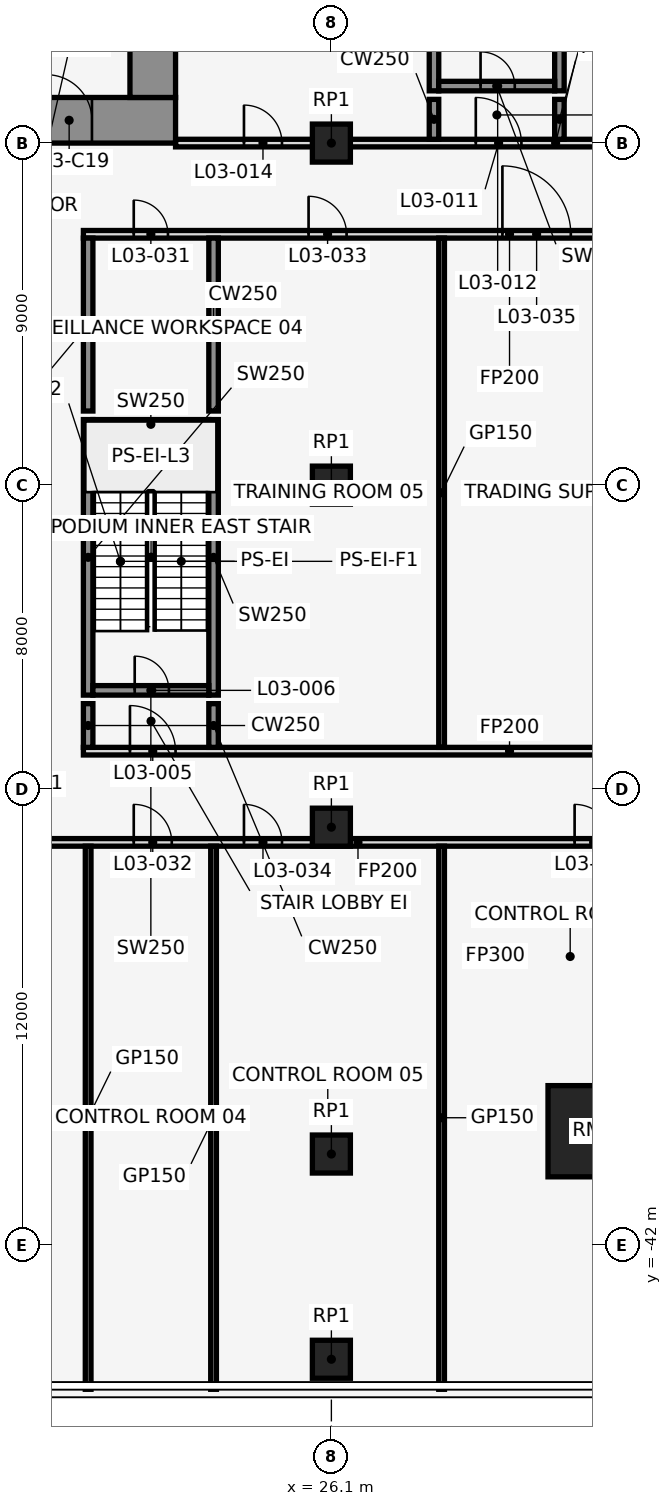
"""IFC4 building model, lengths in metres.
Left out: names, types, materials, properties, quantities, classifications, styles, units other than length and angle.
Written with IfcOpenShell. Run it as: python <this file> out.ifc"""

import sys

from ifc_helpers import new_model, si_unit, direction, frame, frame_2d, origin, origin_2d, place, context, subcontext, project, spatial, rectangle, extrude, element, fill, save


model = new_model("IFC4")
c1 = context("Model", 3, precision=1e-05, world=origin(), true_north=direction((0.0, 1.0)))
c2 = subcontext(c1, "Body", "Model", "MODEL_VIEW")
j1 = project(units=[si_unit("LENGTHUNIT", "METRE"), si_unit("PLANEANGLEUNIT", "RADIAN")], contexts=[c1])
p1 = place(None, origin())
s1 = spatial("IfcSite", under=j1, at=p1, CompositionType="ELEMENT")
p2 = place(p1, origin())
s2 = spatial("IfcBuilding", under=s1, at=p2, CompositionType="ELEMENT")
p3 = place(p2, frame((0.0, 0.0, 20.0)))
s3 = spatial("IfcBuildingStorey", under=s2, at=p3, CompositionType="ELEMENT", Elevation=20.0)
p4 = place(p3, frame((26.1, -39.6, 0.0), z_axis=(0.0, 0.0, 1.0), x_axis=(1.0, 0.0, 0.0)))
e1 = element("IfcColumn", 1, at=p4, inside=s3, PredefinedType="COLUMN", context=c2, shape_type="SweptSolid", body=[
    extrude(rectangle(XDim=1.0, YDim=1.0, at=origin_2d()), origin(), (0.0, 0.0, 1.0), 5.0),
])
p5 = place(p3, frame((33.0, -39.0, 0.0), z_axis=(0.0, 0.0, 1.0), x_axis=(1.0, 0.0, 0.0)))
e2 = element("IfcColumn", 2, at=p5, inside=s3, PredefinedType="COLUMN", context=c2, shape_type="SweptSolid", body=[
    extrude(rectangle(XDim=2.4, YDim=2.4, at=origin_2d()), origin(), (0.0, 0.0, 1.0), 5.0),
])
for number, where, z_axis, x_axis in (
    (3, (26.1, -22.0, 0.0), (0.0, 0.0, 1.0), (1.0, 0.0, 0.0)),
    (4, (26.1, -13.0, 0.0), (0.0, 0.0, 1.0), (1.0, 0.0, 0.0)),
    (5, (26.1, -31.0, 0.0), (0.0, 0.0, 1.0), (1.0, 0.0, 0.0)),
    (6, (26.1, -45.0, 0.0), (0.0, 0.0, 1.0), (1.0, 0.0, 0.0)),
):
    element("IfcColumn", number, at=place(p3, frame(where, z_axis=z_axis, x_axis=x_axis)), inside=s3, PredefinedType="COLUMN", context=c2, shape_type="SweptSolid", body=[
        extrude(rectangle(XDim=1.0, YDim=1.0, at=origin_2d()), origin(), (0.0, 0.0, 1.0), 5.0),
    ])
for number, where, z_axis, x_axis in (
    (7, (28.8, -11.625, 0.0), (0.0, 0.0, 1.0), (0.0, 1.0, 0.0)),
    (8, (32.1, -11.625, 0.0), (0.0, 0.0, 1.0), (0.0, 1.0, 0.0)),
):
    element("IfcWall", number, at=place(p3, frame(where, z_axis=z_axis, x_axis=x_axis)), inside=s3, PredefinedType="SHEAR", context=c2, shape_type="SweptSolid", body=[
        extrude(rectangle(XDim=7.25, YDim=0.25, at=frame_2d((3.625, 0.0))), origin(), (0.0, 0.0, 1.0), 5.0),
    ])
p6 = place(p3, frame((28.925, -11.5, 0.0), z_axis=(0.0, 0.0, 1.0), x_axis=(1.0, 0.0, 0.0)))
e9 = element("IfcWall", 9, at=p6, inside=s3, PredefinedType="SHEAR", context=c2, shape_type="SweptSolid", body=[
    extrude(rectangle(XDim=3.05, YDim=0.25, at=frame_2d((1.525, 0.0))), origin(), (0.0, 0.0, 1.0), 5.0),
])
p7 = place(p6, frame((1.1, 0.0, 0.0)))
e10 = element("IfcOpeningElement", 10, at=p7, cuts=e9, PredefinedType="OPENING", context=c2, shape_type="SweptSolid", body=[
    extrude(rectangle(XDim=0.9, YDim=2.1, at=frame_2d((0.45, 1.05))), frame((0.0, 0.137, 0.0), z_axis=(0.0, -1.0, 0.0), x_axis=(1.0, 0.0, 0.0)), (0.0, 0.0, 1.0), 0.274),
])
for number, where, z_axis, x_axis in (
    (11, (19.7, -27.525, 0.0), (0.0, 0.0, 1.0), (0.0, 1.0, 0.0)),
    (12, (23.0, -27.525, 0.0), (0.0, 0.0, 1.0), (0.0, 1.0, 0.0)),
):
    element("IfcWall", number, at=place(p3, frame(where, z_axis=z_axis, x_axis=x_axis)), inside=s3, PredefinedType="SHEAR", context=c2, shape_type="SweptSolid", body=[
        extrude(rectangle(XDim=7.25, YDim=0.25, at=frame_2d((3.625, 0.0))), origin(), (0.0, 0.0, 1.0), 5.0),
    ])
p8 = place(p3, frame((19.825, -27.4, 0.0), z_axis=(0.0, 0.0, 1.0), x_axis=(1.0, 0.0, 0.0)))
e13 = element("IfcWall", 13, at=p8, inside=s3, PredefinedType="SHEAR", context=c2, shape_type="SweptSolid", body=[
    extrude(rectangle(XDim=3.05, YDim=0.25, at=frame_2d((1.525, 0.0))), origin(), (0.0, 0.0, 1.0), 5.0),
])
p9 = place(p8, frame((1.1, 0.0, 0.0)))
e14 = element("IfcOpeningElement", 14, at=p9, cuts=e13, PredefinedType="OPENING", context=c2, shape_type="SweptSolid", body=[
    extrude(rectangle(XDim=0.9, YDim=2.1, at=frame_2d((0.45, 1.05))), frame((0.0, 0.137, 0.0), z_axis=(0.0, -1.0, 0.0), x_axis=(1.0, 0.0, 0.0)), (0.0, 0.0, 1.0), 0.274),
])
p10 = place(p3, frame((19.825, -20.4, 0.0), z_axis=(0.0, 0.0, 1.0), x_axis=(1.0, 0.0, 0.0)))
e15 = element("IfcWall", 15, at=p10, inside=s3, PredefinedType="SHEAR", context=c2, shape_type="SweptSolid", body=[
    extrude(rectangle(XDim=3.05, YDim=0.25, at=frame_2d((1.525, 0.0))), origin(), (0.0, 0.0, 1.0), 5.0),
])
p11 = place(p3, frame((11.6, -31.4, 0.0), z_axis=(0.0, 0.0, 1.0), x_axis=(1.0, 0.0, 0.0)))
e16 = element("IfcWall", 16, at=p11, inside=s3, PredefinedType="PARTITIONING", context=c2, shape_type="SweptSolid", body=[
    extrude(rectangle(XDim=30.4, YDim=0.2, at=frame_2d((15.2, 0.0))), origin(), (0.0, 0.0, 1.0), 4.7),
])
p12 = place(p11, frame((2.0, 0.0, 0.0)))
e17 = element("IfcOpeningElement", 17, at=p12, cuts=e16, PredefinedType="OPENING", context=c2, shape_type="SweptSolid", body=[
    extrude(rectangle(XDim=1.0, YDim=2.1, at=frame_2d((0.5, 1.05))), frame((0.0, 0.112, 0.0), z_axis=(0.0, -1.0, 0.0), x_axis=(1.0, 0.0, 0.0)), (0.0, 0.0, 1.0), 0.224),
])
p13 = place(p11, frame((9.3, 0.0, 0.0)))
e18 = element("IfcOpeningElement", 18, at=p13, cuts=e16, PredefinedType="OPENING", context=c2, shape_type="SweptSolid", body=[
    extrude(rectangle(XDim=1.0, YDim=2.1, at=frame_2d((0.5, 1.05))), frame((0.0, 0.112, 0.0), z_axis=(0.0, -1.0, 0.0), x_axis=(1.0, 0.0, 0.0)), (0.0, 0.0, 1.0), 0.224),
])
p14 = place(p11, frame((12.2, 0.0, 0.0)))
e19 = element("IfcOpeningElement", 19, at=p14, cuts=e16, PredefinedType="OPENING", context=c2, shape_type="SweptSolid", body=[
    extrude(rectangle(XDim=1.0, YDim=2.1, at=frame_2d((0.5, 1.05))), frame((0.0, 0.112, 0.0), z_axis=(0.0, -1.0, 0.0), x_axis=(1.0, 0.0, 0.0)), (0.0, 0.0, 1.0), 0.224),
])
p15 = place(p11, frame((20.9, 0.0, 0.0)))
e20 = element("IfcOpeningElement", 20, at=p15, cuts=e16, PredefinedType="OPENING", context=c2, shape_type="SweptSolid", body=[
    extrude(rectangle(XDim=1.0, YDim=2.1, at=frame_2d((0.5, 1.05))), frame((0.0, 0.112, 0.0), z_axis=(0.0, -1.0, 0.0), x_axis=(1.0, 0.0, 0.0)), (0.0, 0.0, 1.0), 0.224),
])
p16 = place(p11, frame((27.9, 0.0, 0.0)))
e21 = element("IfcOpeningElement", 21, at=p16, cuts=e16, PredefinedType="OPENING", context=c2, shape_type="SweptSolid", body=[
    extrude(rectangle(XDim=1.0, YDim=2.1, at=frame_2d((0.5, 1.05))), frame((0.0, 0.112, 0.0), z_axis=(0.0, -1.0, 0.0), x_axis=(1.0, 0.0, 0.0)), (0.0, 0.0, 1.0), 0.224),
])
p17 = place(p3, frame((19.575, -29.0, 0.0), z_axis=(0.0, 0.0, 1.0), x_axis=(1.0, 0.0, 0.0)))
e22 = element("IfcWall", 22, at=p17, inside=s3, PredefinedType="PARTITIONING", context=c2, shape_type="SweptSolid", body=[
    extrude(rectangle(XDim=22.425, YDim=0.2, at=frame_2d((11.212, 0.0))), origin(), (0.0, 0.0, 1.0), 4.7),
])
p18 = place(p17, frame((1.225, 0.0, 0.0)))
e23 = element("IfcOpeningElement", 23, at=p18, cuts=e22, PredefinedType="OPENING", context=c2, shape_type="SweptSolid", body=[
    extrude(rectangle(XDim=1.2, YDim=2.1, at=frame_2d((0.6, 1.05))), frame((0.0, 0.112, 0.0), z_axis=(0.0, -1.0, 0.0), x_axis=(1.0, 0.0, 0.0)), (0.0, 0.0, 1.0), 0.224),
])
p19 = place(p17, frame((19.425, 0.0, 0.0)))
e24 = element("IfcOpeningElement", 24, at=p19, cuts=e22, PredefinedType="OPENING", context=c2, shape_type="SweptSolid", body=[
    extrude(rectangle(XDim=1.2, YDim=2.1, at=frame_2d((0.6, 1.05))), frame((0.0, 0.112, 0.0), z_axis=(0.0, -1.0, 0.0), x_axis=(1.0, 0.0, 0.0)), (0.0, 0.0, 1.0), 0.224),
])
p20 = place(p3, frame((19.575, -15.4, 0.0), z_axis=(0.0, 0.0, 1.0), x_axis=(1.0, 0.0, 0.0)))
e25 = element("IfcWall", 25, at=p20, inside=s3, PredefinedType="PARTITIONING", context=c2, shape_type="SweptSolid", body=[
    extrude(rectangle(XDim=22.425, YDim=0.2, at=frame_2d((11.212, 0.0))), origin(), (0.0, 0.0, 1.0), 4.7),
])
p21 = place(p20, frame((1.325, 0.0, 0.0)))
e26 = element("IfcOpeningElement", 26, at=p21, cuts=e25, PredefinedType="OPENING", context=c2, shape_type="SweptSolid", body=[
    extrude(rectangle(XDim=0.9, YDim=2.1, at=frame_2d((0.45, 1.05))), frame((0.0, 0.112, 0.0), z_axis=(0.0, -1.0, 0.0), x_axis=(1.0, 0.0, 0.0)), (0.0, 0.0, 1.0), 0.224),
])
p22 = place(p20, frame((5.925, 0.0, 0.0)))
e27 = element("IfcOpeningElement", 27, at=p22, cuts=e25, PredefinedType="OPENING", context=c2, shape_type="SweptSolid", body=[
    extrude(rectangle(XDim=1.0, YDim=2.1, at=frame_2d((0.5, 1.05))), frame((0.0, 0.112, 0.0), z_axis=(0.0, -1.0, 0.0), x_axis=(1.0, 0.0, 0.0)), (0.0, 0.0, 1.0), 0.224),
])
p23 = place(p20, frame((11.025, 0.0, 0.0)))
e28 = element("IfcOpeningElement", 28, at=p23, cuts=e25, PredefinedType="OPENING", context=c2, shape_type="SweptSolid", body=[
    extrude(rectangle(XDim=1.8, YDim=2.1, at=frame_2d((0.9, 1.05))), frame((0.0, 0.112, 0.0), z_axis=(0.0, -1.0, 0.0), x_axis=(1.0, 0.0, 0.0)), (0.0, 0.0, 1.0), 0.224),
])
p24 = place(p20, frame((19.925, 0.0, 0.0)))
e29 = element("IfcOpeningElement", 29, at=p24, cuts=e25, PredefinedType="OPENING", context=c2, shape_type="SweptSolid", body=[
    extrude(rectangle(XDim=0.9, YDim=2.1, at=frame_2d((0.45, 1.05))), frame((0.0, 0.112, 0.0), z_axis=(0.0, -1.0, 0.0), x_axis=(1.0, 0.0, 0.0)), (0.0, 0.0, 1.0), 0.224),
])
p25 = place(p3, frame((22.0, -13.0, 0.0), z_axis=(0.0, 0.0, 1.0), x_axis=(1.0, 0.0, 0.0)))
e30 = element("IfcWall", 30, at=p25, inside=s3, PredefinedType="PARTITIONING", context=c2, shape_type="SweptSolid", body=[
    extrude(rectangle(XDim=20.0, YDim=0.2, at=frame_2d((10.0, 0.0))), origin(), (0.0, 0.0, 1.0), 4.7),
])
p26 = place(p25, frame((7.9, 0.0, 0.0)))
e31 = element("IfcOpeningElement", 31, at=p26, cuts=e30, PredefinedType="OPENING", context=c2, shape_type="SweptSolid", body=[
    extrude(rectangle(XDim=1.2, YDim=2.1, at=frame_2d((0.6, 1.05))), frame((0.0, 0.112, 0.0), z_axis=(0.0, -1.0, 0.0), x_axis=(1.0, 0.0, 0.0)), (0.0, 0.0, 1.0), 0.224),
])
p27 = place(p25, frame((1.8, 0.0, 0.0)))
e32 = element("IfcOpeningElement", 32, at=p27, cuts=e30, PredefinedType="OPENING", context=c2, shape_type="SweptSolid", body=[
    extrude(rectangle(XDim=1.0, YDim=2.1, at=frame_2d((0.5, 1.05))), frame((0.0, 0.112, 0.0), z_axis=(0.0, -1.0, 0.0), x_axis=(1.0, 0.0, 0.0)), (0.0, 0.0, 1.0), 0.224),
])
p28 = place(p3, frame((19.7, -45.79, 0.0), z_axis=(0.0, 0.0, 1.0), x_axis=(0.0, 1.0, 0.0)))
e33 = element("IfcWall", 33, at=p28, inside=s3, PredefinedType="PARTITIONING", context=c2, shape_type="SweptSolid", body=[
    extrude(rectangle(XDim=14.29, YDim=0.15, at=frame_2d((7.145, 0.0))), origin(), (0.0, 0.0, 1.0), 4.7),
])
p29 = place(p3, frame((19.7, -28.9, 0.0), z_axis=(0.0, 0.0, 1.0), x_axis=(0.0, 1.0, 0.0)))
e34 = element("IfcWall", 34, at=p29, inside=s3, PredefinedType="SHEAR", context=c2, shape_type="SweptSolid", body=[
    extrude(rectangle(XDim=1.15, YDim=0.25, at=frame_2d((0.575, 0.0))), origin(), (0.0, 0.0, 1.0), 5.0),
])
p30 = place(p3, frame((19.7, -20.05, 0.0), z_axis=(0.0, 0.0, 1.0), x_axis=(0.0, 1.0, 0.0)))
e35 = element("IfcWall", 35, at=p30, inside=s3, PredefinedType="SHEAR", context=c2, shape_type="SweptSolid", body=[
    extrude(rectangle(XDim=4.55, YDim=0.25, at=frame_2d((2.275, 0.0))), origin(), (0.0, 0.0, 1.0), 5.0),
])
p31 = place(p3, frame((23.0, -45.79, 0.0), z_axis=(0.0, 0.0, 1.0), x_axis=(0.0, 1.0, 0.0)))
e36 = element("IfcWall", 36, at=p31, inside=s3, PredefinedType="PARTITIONING", context=c2, shape_type="SweptSolid", body=[
    extrude(rectangle(XDim=14.29, YDim=0.15, at=frame_2d((7.145, 0.0))), origin(), (0.0, 0.0, 1.0), 4.7),
])
p32 = place(p3, frame((23.0, -28.9, 0.0), z_axis=(0.0, 0.0, 1.0), x_axis=(0.0, 1.0, 0.0)))
e37 = element("IfcWall", 37, at=p32, inside=s3, PredefinedType="SHEAR", context=c2, shape_type="SweptSolid", body=[
    extrude(rectangle(XDim=1.15, YDim=0.25, at=frame_2d((0.575, 0.0))), origin(), (0.0, 0.0, 1.0), 5.0),
])
p33 = place(p3, frame((23.0, -20.05, 0.0), z_axis=(0.0, 0.0, 1.0), x_axis=(0.0, 1.0, 0.0)))
e38 = element("IfcWall", 38, at=p33, inside=s3, PredefinedType="SHEAR", context=c2, shape_type="SweptSolid", body=[
    extrude(rectangle(XDim=4.55, YDim=0.25, at=frame_2d((2.275, 0.0))), origin(), (0.0, 0.0, 1.0), 5.0),
])
p34 = place(p3, frame((28.8, -12.9, 0.0), z_axis=(0.0, 0.0, 1.0), x_axis=(0.0, 1.0, 0.0)))
e39 = element("IfcWall", 39, at=p34, inside=s3, PredefinedType="SHEAR", context=c2, shape_type="SweptSolid", body=[
    extrude(rectangle(XDim=1.05, YDim=0.25, at=frame_2d((0.525, 0.0))), origin(), (0.0, 0.0, 1.0), 5.0),
])
p35 = place(p3, frame((29.0, -45.79, 0.0), z_axis=(0.0, 0.0, 1.0), x_axis=(0.0, 1.0, 0.0)))
e40 = element("IfcWall", 40, at=p35, inside=s3, PredefinedType="PARTITIONING", context=c2, shape_type="SweptSolid", body=[
    extrude(rectangle(XDim=14.29, YDim=0.15, at=frame_2d((7.145, 0.0))), origin(), (0.0, 0.0, 1.0), 4.7),
])
p36 = place(p3, frame((29.0, -28.9, 0.0), z_axis=(0.0, 0.0, 1.0), x_axis=(0.0, 1.0, 0.0)))
e41 = element("IfcWall", 41, at=p36, inside=s3, PredefinedType="PARTITIONING", context=c2, shape_type="SweptSolid", body=[
    extrude(rectangle(XDim=13.4, YDim=0.15, at=frame_2d((6.7, 0.0))), origin(), (0.0, 0.0, 1.0), 4.7),
])
p37 = place(p3, frame((32.1, -12.9, 0.0), z_axis=(0.0, 0.0, 1.0), x_axis=(0.0, 1.0, 0.0)))
e42 = element("IfcWall", 42, at=p37, inside=s3, PredefinedType="SHEAR", context=c2, shape_type="SweptSolid", body=[
    extrude(rectangle(XDim=1.05, YDim=0.25, at=frame_2d((0.525, 0.0))), origin(), (0.0, 0.0, 1.0), 5.0),
])
p38 = place(p3, frame((-22.0, -12.4, 0.0), z_axis=(0.0, 0.0, 1.0), x_axis=(1.0, 0.0, 0.0)))
e43 = element("IfcWall", 43, at=p38, inside=s3, PredefinedType="SHEAR", context=c2, shape_type="SweptSolid", body=[
    extrude(rectangle(XDim=44.0, YDim=1.2, at=frame_2d((22.0, 0.0))), origin(), (0.0, 0.0, 1.0), 5.0),
])
p39 = place(p38, frame((2.2, 0.0, 0.0)))
e44 = element("IfcOpeningElement", 44, at=p39, cuts=e43, PredefinedType="OPENING", context=c2, shape_type="SweptSolid", body=[
    extrude(rectangle(XDim=1.2, YDim=2.1, at=frame_2d((0.6, 1.05))), frame((0.0, 0.612, 0.0), z_axis=(0.0, -1.0, 0.0), x_axis=(1.0, 0.0, 0.0)), (0.0, 0.0, 1.0), 1.224),
])
p40 = place(p38, frame((21.4, 0.0, 0.0)))
e45 = element("IfcOpeningElement", 45, at=p40, cuts=e43, PredefinedType="OPENING", context=c2, shape_type="SweptSolid", body=[
    extrude(rectangle(XDim=1.2, YDim=2.1, at=frame_2d((0.6, 1.05))), frame((0.0, 0.612, 0.0), z_axis=(0.0, -1.0, 0.0), x_axis=(1.0, 0.0, 0.0)), (0.0, 0.0, 1.0), 1.224),
])
p41 = place(p38, frame((40.6, 0.0, 0.0)))
e46 = element("IfcOpeningElement", 46, at=p41, cuts=e43, PredefinedType="OPENING", context=c2, shape_type="SweptSolid", body=[
    extrude(rectangle(XDim=1.2, YDim=2.1, at=frame_2d((0.6, 1.05))), frame((0.0, 0.612, 0.0), z_axis=(0.0, -1.0, 0.0), x_axis=(1.0, 0.0, 0.0)), (0.0, 0.0, 1.0), 1.224),
])
p42 = place(p38, frame((16.0, 0.0, 0.0)))
e47 = element("IfcOpeningElement", 47, at=p42, cuts=e43, PredefinedType="OPENING", context=c2, shape_type="SweptSolid", body=[
    extrude(rectangle(XDim=1.8, YDim=2.1, at=frame_2d((0.9, 1.05))), frame((0.0, 0.612, 0.0), z_axis=(0.0, -1.0, 0.0), x_axis=(1.0, 0.0, 0.0)), (0.0, 0.0, 1.0), 1.224),
])
p43 = place(p38, frame((6.3, 0.0, 0.0)))
e48 = element("IfcOpeningElement", 48, at=p43, cuts=e43, PredefinedType="OPENING", context=c2, shape_type="SweptSolid", body=[
    extrude(rectangle(XDim=1.2, YDim=2.1, at=frame_2d((0.6, 1.05))), frame((0.0, 0.612, 0.0), z_axis=(0.0, -1.0, 0.0), x_axis=(1.0, 0.0, 0.0)), (0.0, 0.0, 1.0), 1.224),
])
p44 = place(p38, frame((26.2, 0.0, 0.0)))
e49 = element("IfcOpeningElement", 49, at=p44, cuts=e43, PredefinedType="OPENING", context=c2, shape_type="SweptSolid", body=[
    extrude(rectangle(XDim=1.8, YDim=2.1, at=frame_2d((0.9, 1.05))), frame((0.0, 0.612, 0.0), z_axis=(0.0, -1.0, 0.0), x_axis=(1.0, 0.0, 0.0)), (0.0, 0.0, 1.0), 1.224),
])
p45 = place(p38, frame((36.5, 0.0, 0.0)))
e50 = element("IfcOpeningElement", 50, at=p45, cuts=e43, PredefinedType="OPENING", context=c2, shape_type="SweptSolid", body=[
    extrude(rectangle(XDim=1.2, YDim=2.1, at=frame_2d((0.6, 1.05))), frame((0.0, 0.612, 0.0), z_axis=(0.0, -1.0, 0.0), x_axis=(1.0, 0.0, 0.0)), (0.0, 0.0, 1.0), 1.224),
])
p46 = place(p3, frame((21.4, -11.8, 0.0), z_axis=(0.0, 0.0, 1.0), x_axis=(0.0, 1.0, 0.0)))
e51 = element("IfcWall", 51, at=p46, inside=s3, PredefinedType="SHEAR", context=c2, shape_type="SweptSolid", body=[
    extrude(rectangle(XDim=10.6, YDim=1.2, at=frame_2d((5.3, 0.0))), origin(), (0.0, 0.0, 1.0), 5.0),
])
p47 = place(p18, origin())
e52 = element("IfcDoor", 52, at=p47, inside=s3, OperationType="SINGLE_SWING_LEFT", PredefinedType="DOOR", context=c2, shape_type="SweptSolid", body=[
    extrude(rectangle(XDim=1.2, YDim=2.1, at=frame_2d((0.6, 1.05))), frame((0.0, 0.025, 0.0), z_axis=(0.0, -1.0, 0.0), x_axis=(1.0, 0.0, 0.0)), (0.0, 0.0, 1.0), 0.05),
])
fill(e23, e52)
p48 = place(p9, origin())
e53 = element("IfcDoor", 53, at=p48, inside=s3, OperationType="SINGLE_SWING_RIGHT", PredefinedType="DOOR", context=c2, shape_type="SweptSolid", body=[
    extrude(rectangle(XDim=0.9, YDim=2.1, at=frame_2d((0.45, 1.05))), frame((0.0, 0.025, 0.0), z_axis=(0.0, -1.0, 0.0), x_axis=(1.0, 0.0, 0.0)), (0.0, 0.0, 1.0), 0.05),
])
fill(e14, e53)
p49 = place(p26, origin())
e54 = element("IfcDoor", 54, at=p49, inside=s3, OperationType="SINGLE_SWING_LEFT", PredefinedType="DOOR", context=c2, shape_type="SweptSolid", body=[
    extrude(rectangle(XDim=1.2, YDim=2.1, at=frame_2d((0.6, 1.05))), frame((0.0, 0.025, 0.0), z_axis=(0.0, -1.0, 0.0), x_axis=(1.0, 0.0, 0.0)), (0.0, 0.0, 1.0), 0.05),
])
fill(e31, e54)
p50 = place(p7, origin())
e55 = element("IfcDoor", 55, at=p50, inside=s3, OperationType="SINGLE_SWING_RIGHT", PredefinedType="DOOR", context=c2, shape_type="SweptSolid", body=[
    extrude(rectangle(XDim=0.9, YDim=2.1, at=frame_2d((0.45, 1.05))), frame((0.0, 0.025, 0.0), z_axis=(0.0, -1.0, 0.0), x_axis=(1.0, 0.0, 0.0)), (0.0, 0.0, 1.0), 0.05),
])
fill(e10, e55)
p51 = place(p27, origin())
e56 = element("IfcDoor", 56, at=p51, inside=s3, OperationType="SINGLE_SWING_LEFT", PredefinedType="DOOR", context=c2, shape_type="SweptSolid", body=[
    extrude(rectangle(XDim=1.0, YDim=2.1, at=frame_2d((0.5, 1.05))), frame((0.0, 0.025, 0.0), z_axis=(0.0, -1.0, 0.0), x_axis=(1.0, 0.0, 0.0)), (0.0, 0.0, 1.0), 0.05),
])
fill(e32, e56)
p52 = place(p21, frame((0.9, 0.0, 0.0), z_axis=(0.0, 0.0, 1.0), x_axis=(-1.0, 0.0, 0.0)))
e57 = element("IfcDoor", 57, at=p52, inside=s3, OperationType="SINGLE_SWING_LEFT", PredefinedType="DOOR", context=c2, shape_type="SweptSolid", body=[
    extrude(rectangle(XDim=0.9, YDim=2.1, at=frame_2d((0.45, 1.05))), frame((0.0, 0.025, 0.0), z_axis=(0.0, -1.0, 0.0), x_axis=(1.0, 0.0, 0.0)), (0.0, 0.0, 1.0), 0.05),
])
fill(e26, e57)
p53 = place(p13, frame((1.0, 0.0, 0.0), z_axis=(0.0, 0.0, 1.0), x_axis=(-1.0, 0.0, 0.0)))
e58 = element("IfcDoor", 58, at=p53, inside=s3, OperationType="SINGLE_SWING_RIGHT", PredefinedType="DOOR", context=c2, shape_type="SweptSolid", body=[
    extrude(rectangle(XDim=1.0, YDim=2.1, at=frame_2d((0.5, 1.05))), frame((0.0, 0.025, 0.0), z_axis=(0.0, -1.0, 0.0), x_axis=(1.0, 0.0, 0.0)), (0.0, 0.0, 1.0), 0.05),
])
fill(e18, e58)
p54 = place(p22, frame((1.0, 0.0, 0.0), z_axis=(0.0, 0.0, 1.0), x_axis=(-1.0, 0.0, 0.0)))
e59 = element("IfcDoor", 59, at=p54, inside=s3, OperationType="SINGLE_SWING_RIGHT", PredefinedType="DOOR", context=c2, shape_type="SweptSolid", body=[
    extrude(rectangle(XDim=1.0, YDim=2.1, at=frame_2d((0.5, 1.05))), frame((0.0, 0.025, 0.0), z_axis=(0.0, -1.0, 0.0), x_axis=(1.0, 0.0, 0.0)), (0.0, 0.0, 1.0), 0.05),
])
fill(e27, e59)
p55 = place(p14, frame((1.0, 0.0, 0.0), z_axis=(0.0, 0.0, 1.0), x_axis=(-1.0, 0.0, 0.0)))
e60 = element("IfcDoor", 60, at=p55, inside=s3, OperationType="SINGLE_SWING_LEFT", PredefinedType="DOOR", context=c2, shape_type="SweptSolid", body=[
    extrude(rectangle(XDim=1.0, YDim=2.1, at=frame_2d((0.5, 1.05))), frame((0.0, 0.025, 0.0), z_axis=(0.0, -1.0, 0.0), x_axis=(1.0, 0.0, 0.0)), (0.0, 0.0, 1.0), 0.05),
])
fill(e19, e60)
p56 = place(p23, origin())
e61 = element("IfcDoor", 61, at=p56, inside=s3, OperationType="SINGLE_SWING_LEFT", PredefinedType="DOOR", context=c2, shape_type="SweptSolid", body=[
    extrude(rectangle(XDim=1.8, YDim=2.1, at=frame_2d((0.9, 1.05))), frame((0.0, 0.025, 0.0), z_axis=(0.0, -1.0, 0.0), x_axis=(1.0, 0.0, 0.0)), (0.0, 0.0, 1.0), 0.05),
])
fill(e28, e61)
p57 = place(p15, frame((1.0, 0.0, 0.0), z_axis=(0.0, 0.0, 1.0), x_axis=(-1.0, 0.0, 0.0)))
e62 = element("IfcDoor", 62, at=p57, inside=s3, OperationType="SINGLE_SWING_RIGHT", PredefinedType="DOOR", context=c2, shape_type="SweptSolid", body=[
    extrude(rectangle(XDim=1.0, YDim=2.1, at=frame_2d((0.5, 1.05))), frame((0.0, 0.025, 0.0), z_axis=(0.0, -1.0, 0.0), x_axis=(1.0, 0.0, 0.0)), (0.0, 0.0, 1.0), 0.05),
])
fill(e20, e62)
p58 = place(p41, frame((1.2, 0.0, 0.0), z_axis=(0.0, 0.0, 1.0), x_axis=(-1.0, 0.0, 0.0)))
e63 = element("IfcDoor", 63, at=p58, inside=s3, OperationType="SINGLE_SWING_RIGHT", PredefinedType="DOOR", context=c2, shape_type="SweptSolid", body=[
    extrude(rectangle(XDim=1.2, YDim=2.1, at=frame_2d((0.6, 1.05))), frame((0.0, 0.025, 0.0), z_axis=(0.0, -1.0, 0.0), x_axis=(1.0, 0.0, 0.0)), (0.0, 0.0, 1.0), 0.05),
])
fill(e46, e63)
save(model, sys.argv[1])
